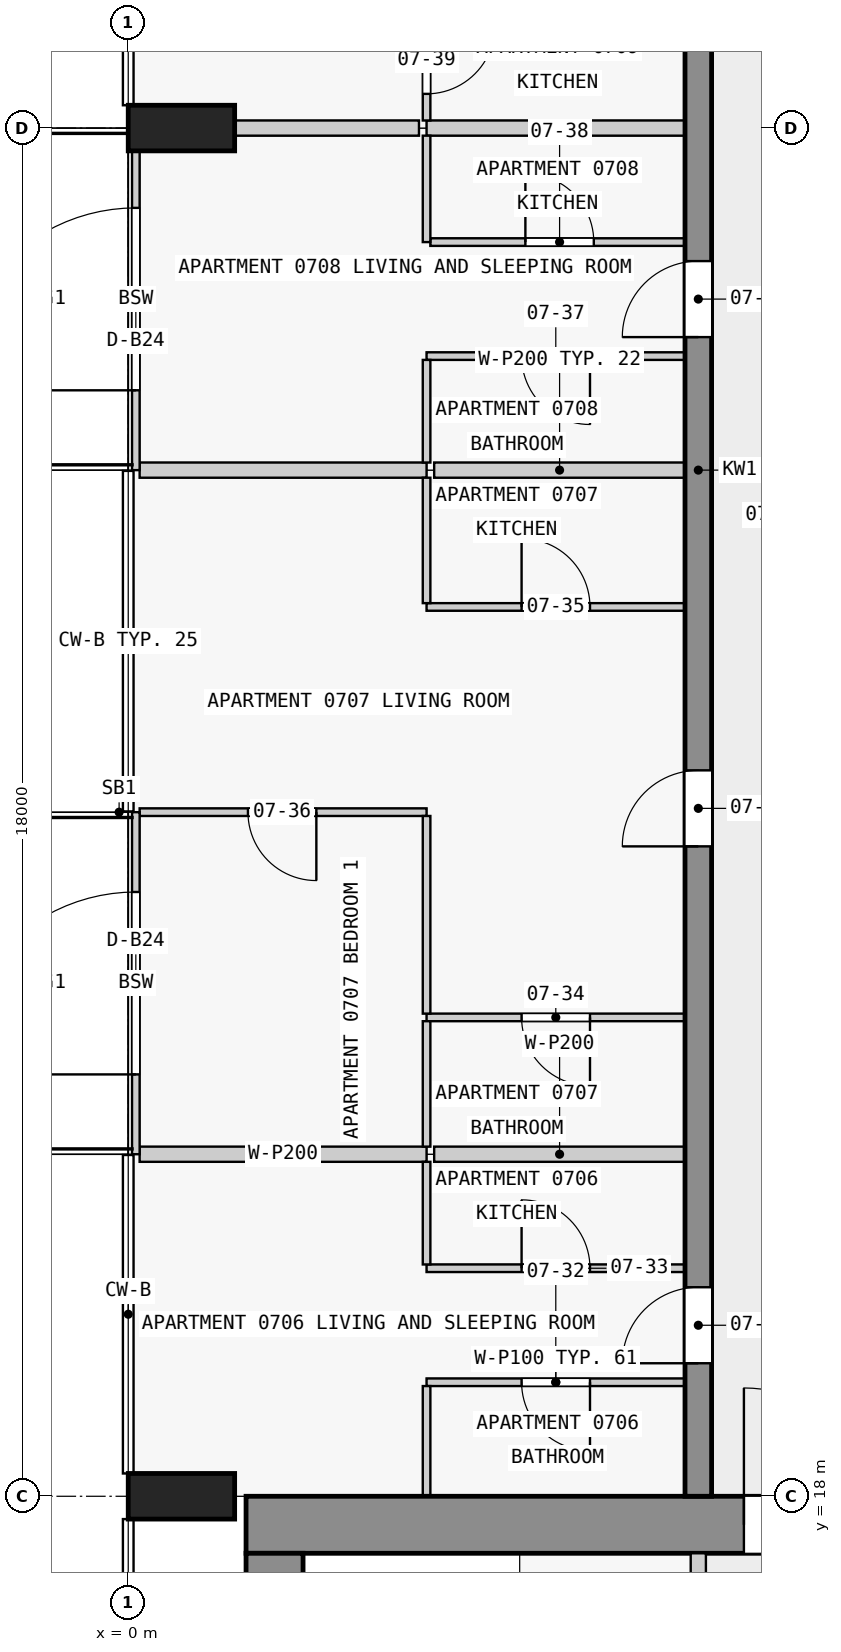
"""IFC4 building model, lengths in metres.
Left out: names, types, materials, properties, quantities, classifications, styles, units other than length and angle.
Written with IfcOpenShell. Run it as: python <this file> out.ifc"""

import sys

from ifc_helpers import new_model, si_unit, direction, frame, frame_2d, origin, origin_2d, place, context, subcontext, project, spatial, rectangle, extrude, element, fill, save


model = new_model("IFC4")
c1 = context("Model", 3, precision=1e-05, world=origin(), true_north=direction((0.0, 1.0)))
c2 = subcontext(c1, "Body", "Model", "MODEL_VIEW")
j1 = project(units=[si_unit("LENGTHUNIT", "METRE"), si_unit("PLANEANGLEUNIT", "RADIAN")], contexts=[c1])
p1 = place(None, origin())
s1 = spatial("IfcSite", under=j1, at=p1, CompositionType="ELEMENT")
p2 = place(p1, origin())
s2 = spatial("IfcBuilding", under=s1, at=p2, CompositionType="ELEMENT")
p3 = place(p2, frame((0.0, 0.0, 33.8)))
s3 = spatial("IfcBuildingStorey", under=s2, at=p3, CompositionType="ELEMENT", Elevation=33.8)
for number, where, z_axis, x_axis in (
    (1, (0.7, 36.0, 0.0), (0.0, 0.0, 1.0), (0.0, 1.0, 0.0)),
    (2, (0.7, 18.0, 0.0), (0.0, 0.0, 1.0), (0.0, 1.0, 0.0)),
):
    element("IfcColumn", number, at=place(p3, frame(where, z_axis=z_axis, x_axis=x_axis)), inside=s3, PredefinedType="COLUMN", context=c2, shape_type="SweptSolid", body=[
        extrude(rectangle(XDim=0.6, YDim=1.4, at=origin_2d()), origin(), (0.0, 0.0, 1.0), 3.5),
    ])
p4 = place(p3, frame((1.55, 17.625, 0.0), z_axis=(0.0, 0.0, 1.0), x_axis=(1.0, 0.0, 0.0)))
e3 = element("IfcWall", 3, at=p4, inside=s3, PredefinedType="SHEAR", context=c2, shape_type="SweptSolid", body=[
    extrude(rectangle(XDim=20.95, YDim=0.75, at=frame_2d((10.475, 0.0))), origin(), (0.0, 0.0, 1.0), 3.25),
])
p5 = place(p4, frame((6.55, 0.0, 0.0)))
e4 = element("IfcOpeningElement", 4, at=p5, cuts=e3, PredefinedType="OPENING", context=c2, shape_type="SweptSolid", body=[
    extrude(rectangle(XDim=1.8, YDim=2.1, at=frame_2d((0.9, 1.05))), frame((0.0, 0.385, 0.0), z_axis=(0.0, -1.0, 0.0), x_axis=(1.0, 0.0, 0.0)), (0.0, 0.0, 1.0), 0.77),
])
p6 = place(p3, frame((1.925, 2.5, 0.0), z_axis=(0.0, 0.0, 1.0), x_axis=(0.0, 1.0, 0.0)))
e5 = element("IfcWall", 5, at=p6, inside=s3, PredefinedType="SHEAR", context=c2, shape_type="SweptSolid", body=[
    extrude(rectangle(XDim=14.75, YDim=0.75, at=frame_2d((7.375, 0.0))), origin(), (0.0, 0.0, 1.0), 3.25),
])
p7 = place(p3, frame((7.5, 18.0, 0.0), z_axis=(0.0, 0.0, 1.0), x_axis=(0.0, 1.0, 0.0)))
e6 = element("IfcWall", 6, at=p7, inside=s3, PredefinedType="SHEAR", context=c2, shape_type="SweptSolid", body=[
    extrude(rectangle(XDim=27.0, YDim=0.35, at=frame_2d((13.5, 0.0))), origin(), (0.0, 0.0, 1.0), 3.25),
])
p8 = place(p7, frame((1.75, 0.0, 0.0)))
e7 = element("IfcOpeningElement", 7, at=p8, cuts=e6, PredefinedType="OPENING", context=c2, shape_type="SweptSolid", body=[
    extrude(rectangle(XDim=1.0, YDim=2.1, at=frame_2d((0.5, 1.05))), frame((0.0, 0.185, 0.0), z_axis=(0.0, -1.0, 0.0), x_axis=(1.0, 0.0, 0.0)), (0.0, 0.0, 1.0), 0.37),
])
p9 = place(p7, frame((8.55, 0.0, 0.0)))
e8 = element("IfcOpeningElement", 8, at=p9, cuts=e6, PredefinedType="OPENING", context=c2, shape_type="SweptSolid", body=[
    extrude(rectangle(XDim=1.0, YDim=2.1, at=frame_2d((0.5, 1.05))), frame((0.0, 0.185, 0.0), z_axis=(0.0, -1.0, 0.0), x_axis=(1.0, 0.0, 0.0)), (0.0, 0.0, 1.0), 0.37),
])
p10 = place(p7, frame((15.25, 0.0, 0.0)))
e9 = element("IfcOpeningElement", 9, at=p10, cuts=e6, PredefinedType="OPENING", context=c2, shape_type="SweptSolid", body=[
    extrude(rectangle(XDim=1.0, YDim=2.1, at=frame_2d((0.5, 1.05))), frame((0.0, 0.185, 0.0), z_axis=(0.0, -1.0, 0.0), x_axis=(1.0, 0.0, 0.0)), (0.0, 0.0, 1.0), 0.37),
])
p11 = place(p7, frame((21.35, 0.0, 0.0)))
e10 = element("IfcOpeningElement", 10, at=p11, cuts=e6, PredefinedType="OPENING", context=c2, shape_type="SweptSolid", body=[
    extrude(rectangle(XDim=1.0, YDim=2.1, at=frame_2d((0.5, 1.05))), frame((0.0, 0.185, 0.0), z_axis=(0.0, -1.0, 0.0), x_axis=(1.0, 0.0, 0.0)), (0.0, 0.0, 1.0), 0.37),
])
p12 = place(p3, frame((0.1, 22.5, 0.0), z_axis=(0.0, 0.0, 1.0), x_axis=(0.0, 1.0, 0.0)))
e11 = element("IfcWall", 11, at=p12, inside=s3, PredefinedType="STANDARD", context=c2, shape_type="SweptSolid", body=[
    extrude(rectangle(XDim=4.5, YDim=0.1, at=frame_2d((2.25, 0.0))), origin(), (0.0, 0.0, 1.0), 3.25),
])
p13 = place(p12, frame((1.05, 0.0, 0.0)))
e12 = element("IfcOpeningElement", 12, at=p13, cuts=e11, PredefinedType="OPENING", context=c2, shape_type="SweptSolid", body=[
    extrude(rectangle(XDim=2.4, YDim=2.4, at=frame_2d((1.2, 1.2))), frame((0.0, 0.06, 0.0), z_axis=(0.0, -1.0, 0.0), x_axis=(1.0, 0.0, 0.0)), (0.0, 0.0, 1.0), 0.12),
])
p14 = place(p3, frame((0.1, 31.5, 0.0), z_axis=(0.0, 0.0, 1.0), x_axis=(0.0, 1.0, 0.0)))
e13 = element("IfcWall", 13, at=p14, inside=s3, PredefinedType="STANDARD", context=c2, shape_type="SweptSolid", body=[
    extrude(rectangle(XDim=4.5, YDim=0.1, at=frame_2d((2.25, 0.0))), origin(), (0.0, 0.0, 1.0), 3.25),
])
p15 = place(p14, frame((1.05, 0.0, 0.0)))
e14 = element("IfcOpeningElement", 14, at=p15, cuts=e13, PredefinedType="OPENING", context=c2, shape_type="SweptSolid", body=[
    extrude(rectangle(XDim=2.4, YDim=2.4, at=frame_2d((1.2, 1.2))), frame((0.0, 0.06, 0.0), z_axis=(0.0, -1.0, 0.0), x_axis=(1.0, 0.0, 0.0)), (0.0, 0.0, 1.0), 0.12),
])
p16 = place(p3, frame((7.5, 10.1, 0.0), z_axis=(0.0, 0.0, 1.0), x_axis=(0.0, 1.0, 0.0)))
e15 = element("IfcWall", 15, at=p16, inside=s3, PredefinedType="PARTITIONING", context=c2, shape_type="SweptSolid", body=[
    extrude(rectangle(XDim=7.15, YDim=0.2, at=frame_2d((3.575, 0.0))), origin(), (0.0, 0.0, 1.0), 3.25),
])
p17 = place(p16, frame((1.05, 0.0, 0.0)))
e16 = element("IfcOpeningElement", 16, at=p17, cuts=e15, PredefinedType="OPENING", context=c2, shape_type="SweptSolid", body=[
    extrude(rectangle(XDim=0.9, YDim=2.1, at=frame_2d((0.45, 1.05))), frame((0.0, 0.11, 0.0), z_axis=(0.0, -1.0, 0.0), x_axis=(1.0, 0.0, 0.0)), (0.0, 0.0, 1.0), 0.22),
])
p18 = place(p16, frame((4.625, 0.0, 0.0)))
e17 = element("IfcOpeningElement", 17, at=p18, cuts=e15, PredefinedType="OPENING", context=c2, shape_type="SweptSolid", body=[
    extrude(rectangle(XDim=0.9, YDim=2.1, at=frame_2d((0.45, 1.05))), frame((0.0, 0.11, 0.0), z_axis=(0.0, -1.0, 0.0), x_axis=(1.0, 0.0, 0.0)), (0.0, 0.0, 1.0), 0.22),
])
p19 = place(p3, frame((7.325, 19.5, 0.0), z_axis=(0.0, 0.0, 1.0), x_axis=(-1.0, 0.0, 0.0)))
e18 = element("IfcWall", 18, at=p19, inside=s3, PredefinedType="PARTITIONING", context=c2, shape_type="SweptSolid", body=[
    extrude(rectangle(XDim=3.4, YDim=0.1, at=frame_2d((1.7, 0.0))), origin(), (0.0, 0.0, 1.0), 3.25),
])
p20 = place(p19, frame((1.25, 0.0, 0.0)))
e19 = element("IfcOpeningElement", 19, at=p20, cuts=e18, PredefinedType="OPENING", context=c2, shape_type="SweptSolid", body=[
    extrude(rectangle(XDim=0.9, YDim=2.1, at=frame_2d((0.45, 1.05))), frame((0.0, 0.06, 0.0), z_axis=(0.0, -1.0, 0.0), x_axis=(1.0, 0.0, 0.0)), (0.0, 0.0, 1.0), 0.12),
])
p21 = place(p3, frame((3.925, 21.0, 0.0), z_axis=(0.0, 0.0, 1.0), x_axis=(1.0, 0.0, 0.0)))
e20 = element("IfcWall", 20, at=p21, inside=s3, PredefinedType="PARTITIONING", context=c2, shape_type="SweptSolid", body=[
    extrude(rectangle(XDim=3.4, YDim=0.1, at=frame_2d((1.7, 0.0))), origin(), (0.0, 0.0, 1.0), 3.25),
])
p22 = place(p21, frame((1.25, 0.0, 0.0)))
e21 = element("IfcOpeningElement", 21, at=p22, cuts=e20, PredefinedType="OPENING", context=c2, shape_type="SweptSolid", body=[
    extrude(rectangle(XDim=0.9, YDim=2.1, at=frame_2d((0.45, 1.05))), frame((0.0, 0.06, 0.0), z_axis=(0.0, -1.0, 0.0), x_axis=(1.0, 0.0, 0.0)), (0.0, 0.0, 1.0), 0.12),
])
p23 = place(p3, frame((7.325, 22.5, 0.0), z_axis=(0.0, 0.0, 1.0), x_axis=(-1.0, 0.0, 0.0)))
e22 = element("IfcWall", 22, at=p23, inside=s3, PredefinedType="PARTITIONING", context=c2, shape_type="SweptSolid", body=[
    extrude(rectangle(XDim=3.3, YDim=0.2, at=frame_2d((1.65, 0.0))), origin(), (0.0, 0.0, 1.0), 3.25),
])
p24 = place(p3, frame((0.15, 22.5, 0.0), z_axis=(0.0, 0.0, 1.0), x_axis=(1.0, 0.0, 0.0)))
e23 = element("IfcWall", 23, at=p24, inside=s3, PredefinedType="PARTITIONING", context=c2, shape_type="SweptSolid", body=[
    extrude(rectangle(XDim=3.775, YDim=0.2, at=frame_2d((1.888, 0.0))), origin(), (0.0, 0.0, 1.0), 3.25),
])
p25 = place(p3, frame((7.325, 24.3, 0.0), z_axis=(0.0, 0.0, 1.0), x_axis=(-1.0, 0.0, 0.0)))
e24 = element("IfcWall", 24, at=p25, inside=s3, PredefinedType="PARTITIONING", context=c2, shape_type="SweptSolid", body=[
    extrude(rectangle(XDim=3.4, YDim=0.1, at=frame_2d((1.7, 0.0))), origin(), (0.0, 0.0, 1.0), 3.25),
])
p26 = place(p25, frame((1.25, 0.0, 0.0)))
e25 = element("IfcOpeningElement", 25, at=p26, cuts=e24, PredefinedType="OPENING", context=c2, shape_type="SweptSolid", body=[
    extrude(rectangle(XDim=0.9, YDim=2.1, at=frame_2d((0.45, 1.05))), frame((0.0, 0.06, 0.0), z_axis=(0.0, -1.0, 0.0), x_axis=(1.0, 0.0, 0.0)), (0.0, 0.0, 1.0), 0.12),
])
p27 = place(p3, frame((3.925, 27.0, 0.0), z_axis=(0.0, 0.0, 1.0), x_axis=(-1.0, 0.0, 0.0)))
e26 = element("IfcWall", 26, at=p27, inside=s3, PredefinedType="PARTITIONING", context=c2, shape_type="SweptSolid", body=[
    extrude(rectangle(XDim=3.775, YDim=0.1, at=frame_2d((1.888, 0.0))), origin(), (0.0, 0.0, 1.0), 3.25),
])
p28 = place(p27, frame((1.45, 0.0, 0.0)))
e27 = element("IfcOpeningElement", 27, at=p28, cuts=e26, PredefinedType="OPENING", context=c2, shape_type="SweptSolid", body=[
    extrude(rectangle(XDim=0.9, YDim=2.1, at=frame_2d((0.45, 1.05))), frame((0.0, 0.06, 0.0), z_axis=(0.0, -1.0, 0.0), x_axis=(1.0, 0.0, 0.0)), (0.0, 0.0, 1.0), 0.12),
])
p29 = place(p3, frame((3.925, 29.7, 0.0), z_axis=(0.0, 0.0, 1.0), x_axis=(1.0, 0.0, 0.0)))
e28 = element("IfcWall", 28, at=p29, inside=s3, PredefinedType="PARTITIONING", context=c2, shape_type="SweptSolid", body=[
    extrude(rectangle(XDim=3.4, YDim=0.1, at=frame_2d((1.7, 0.0))), origin(), (0.0, 0.0, 1.0), 3.25),
])
p30 = place(p29, frame((1.25, 0.0, 0.0)))
e29 = element("IfcOpeningElement", 29, at=p30, cuts=e28, PredefinedType="OPENING", context=c2, shape_type="SweptSolid", body=[
    extrude(rectangle(XDim=0.9, YDim=2.1, at=frame_2d((0.45, 1.05))), frame((0.0, 0.06, 0.0), z_axis=(0.0, -1.0, 0.0), x_axis=(1.0, 0.0, 0.0)), (0.0, 0.0, 1.0), 0.12),
])
p31 = place(p3, frame((7.325, 31.5, 0.0), z_axis=(0.0, 0.0, 1.0), x_axis=(-1.0, 0.0, 0.0)))
e30 = element("IfcWall", 30, at=p31, inside=s3, PredefinedType="PARTITIONING", context=c2, shape_type="SweptSolid", body=[
    extrude(rectangle(XDim=3.3, YDim=0.2, at=frame_2d((1.65, 0.0))), origin(), (0.0, 0.0, 1.0), 3.25),
])
p32 = place(p3, frame((0.15, 31.5, 0.0), z_axis=(0.0, 0.0, 1.0), x_axis=(1.0, 0.0, 0.0)))
e31 = element("IfcWall", 31, at=p32, inside=s3, PredefinedType="PARTITIONING", context=c2, shape_type="SweptSolid", body=[
    extrude(rectangle(XDim=3.775, YDim=0.2, at=frame_2d((1.888, 0.0))), origin(), (0.0, 0.0, 1.0), 3.25),
])
p33 = place(p3, frame((7.325, 33.0, 0.0), z_axis=(0.0, 0.0, 1.0), x_axis=(-1.0, 0.0, 0.0)))
e32 = element("IfcWall", 32, at=p33, inside=s3, PredefinedType="PARTITIONING", context=c2, shape_type="SweptSolid", body=[
    extrude(rectangle(XDim=3.4, YDim=0.1, at=frame_2d((1.7, 0.0))), origin(), (0.0, 0.0, 1.0), 3.25),
])
p34 = place(p33, frame((1.25, 0.0, 0.0)))
e33 = element("IfcOpeningElement", 33, at=p34, cuts=e32, PredefinedType="OPENING", context=c2, shape_type="SweptSolid", body=[
    extrude(rectangle(XDim=0.9, YDim=2.1, at=frame_2d((0.45, 1.05))), frame((0.0, 0.06, 0.0), z_axis=(0.0, -1.0, 0.0), x_axis=(1.0, 0.0, 0.0)), (0.0, 0.0, 1.0), 0.12),
])
p35 = place(p3, frame((3.975, 34.5, 0.0), z_axis=(0.0, 0.0, 1.0), x_axis=(1.0, 0.0, 0.0)))
e34 = element("IfcWall", 34, at=p35, inside=s3, PredefinedType="PARTITIONING", context=c2, shape_type="SweptSolid", body=[
    extrude(rectangle(XDim=3.35, YDim=0.1, at=frame_2d((1.675, 0.0))), origin(), (0.0, 0.0, 1.0), 3.25),
])
p36 = place(p35, frame((1.25, 0.0, 0.0)))
e35 = element("IfcOpeningElement", 35, at=p36, cuts=e34, PredefinedType="OPENING", context=c2, shape_type="SweptSolid", body=[
    extrude(rectangle(XDim=0.9, YDim=2.1, at=frame_2d((0.45, 1.05))), frame((0.0, 0.06, 0.0), z_axis=(0.0, -1.0, 0.0), x_axis=(1.0, 0.0, 0.0)), (0.0, 0.0, 1.0), 0.12),
])
p37 = place(p3, frame((7.325, 36.0, 0.0), z_axis=(0.0, 0.0, 1.0), x_axis=(-1.0, 0.0, 0.0)))
e36 = element("IfcWall", 36, at=p37, inside=s3, PredefinedType="PARTITIONING", context=c2, shape_type="SweptSolid", body=[
    extrude(rectangle(XDim=3.4, YDim=0.2, at=frame_2d((1.7, 0.0))), origin(), (0.0, 0.0, 1.0), 3.25),
])
p38 = place(p3, frame((1.4, 36.0, 0.0), z_axis=(0.0, 0.0, 1.0), x_axis=(1.0, 0.0, 0.0)))
e37 = element("IfcWall", 37, at=p38, inside=s3, PredefinedType="PARTITIONING", context=c2, shape_type="SweptSolid", body=[
    extrude(rectangle(XDim=2.425, YDim=0.2, at=frame_2d((1.212, 0.0))), origin(), (0.0, 0.0, 1.0), 3.25),
])
p39 = place(p3, frame((3.925, 19.45, 0.0), z_axis=(0.0, 0.0, 1.0), x_axis=(0.0, -1.0, 0.0)))
e38 = element("IfcWall", 38, at=p39, inside=s3, PredefinedType="PARTITIONING", context=c2, shape_type="SweptSolid", body=[
    extrude(rectangle(XDim=1.45, YDim=0.1, at=frame_2d((0.725, 0.0))), origin(), (0.0, 0.0, 1.0), 3.25),
])
p40 = place(p3, frame((3.925, 22.4, 0.0), z_axis=(0.0, 0.0, 1.0), x_axis=(0.0, -1.0, 0.0)))
e39 = element("IfcWall", 39, at=p40, inside=s3, PredefinedType="PARTITIONING", context=c2, shape_type="SweptSolid", body=[
    extrude(rectangle(XDim=1.35, YDim=0.1, at=frame_2d((0.675, 0.0))), origin(), (0.0, 0.0, 1.0), 3.25),
])
for number, where, z_axis, x_axis in (
    (40, (3.925, 24.25, 0.0), (0.0, 0.0, 1.0), (0.0, -1.0, 0.0)),
    (41, (3.925, 31.4, 0.0), (0.0, 0.0, 1.0), (0.0, -1.0, 0.0)),
):
    element("IfcWall", number, at=place(p3, frame(where, z_axis=z_axis, x_axis=x_axis)), inside=s3, PredefinedType="PARTITIONING", context=c2, shape_type="SweptSolid", body=[
        extrude(rectangle(XDim=1.65, YDim=0.1, at=frame_2d((0.825, 0.0))), origin(), (0.0, 0.0, 1.0), 3.25),
    ])
p41 = place(p3, frame((3.925, 32.95, 0.0), z_axis=(0.0, 0.0, 1.0), x_axis=(0.0, -1.0, 0.0)))
e42 = element("IfcWall", 42, at=p41, inside=s3, PredefinedType="PARTITIONING", context=c2, shape_type="SweptSolid", body=[
    extrude(rectangle(XDim=1.35, YDim=0.1, at=frame_2d((0.675, 0.0))), origin(), (0.0, 0.0, 1.0), 3.25),
])
p42 = place(p3, frame((3.925, 35.9, 0.0), z_axis=(0.0, 0.0, 1.0), x_axis=(0.0, -1.0, 0.0)))
e43 = element("IfcWall", 43, at=p42, inside=s3, PredefinedType="PARTITIONING", context=c2, shape_type="SweptSolid", body=[
    extrude(rectangle(XDim=1.4, YDim=0.1, at=frame_2d((0.7, 0.0))), origin(), (0.0, 0.0, 1.0), 3.25),
])
p43 = place(p3, frame((3.925, 39.1, 0.0), z_axis=(0.0, 0.0, 1.0), x_axis=(0.0, -1.0, 0.0)))
e44 = element("IfcWall", 44, at=p43, inside=s3, PredefinedType="PARTITIONING", context=c2, shape_type="SweptSolid", body=[
    extrude(rectangle(XDim=3.0, YDim=0.1, at=frame_2d((1.5, 0.0))), origin(), (0.0, 0.0, 1.0), 3.25),
])
p44 = place(p43, frame((1.75, 0.0, 0.0)))
e45 = element("IfcOpeningElement", 45, at=p44, cuts=e44, PredefinedType="OPENING", context=c2, shape_type="SweptSolid", body=[
    extrude(rectangle(XDim=0.9, YDim=2.1, at=frame_2d((0.45, 1.05))), frame((0.0, 0.06, 0.0), z_axis=(0.0, -1.0, 0.0), x_axis=(1.0, 0.0, 0.0)), (0.0, 0.0, 1.0), 0.12),
])
p45 = place(p3, frame((3.925, 24.35, 0.0), z_axis=(0.0, 0.0, 1.0), x_axis=(0.0, 1.0, 0.0)))
e46 = element("IfcWall", 46, at=p45, inside=s3, PredefinedType="PARTITIONING", context=c2, shape_type="SweptSolid", body=[
    extrude(rectangle(XDim=2.6, YDim=0.1, at=frame_2d((1.3, 0.0))), origin(), (0.0, 0.0, 1.0), 3.25),
])
p46 = place(p13, origin())
e47 = element("IfcDoor", 47, at=p46, inside=s3, OperationType="SINGLE_SWING_LEFT", PredefinedType="DOOR", context=c2, shape_type="SweptSolid", body=[
    extrude(rectangle(XDim=2.4, YDim=2.4, at=frame_2d((1.2, 1.2))), frame((0.0, 0.025, 0.0), z_axis=(0.0, -1.0, 0.0), x_axis=(1.0, 0.0, 0.0)), (0.0, 0.0, 1.0), 0.05),
])
fill(e12, e47)
p47 = place(p15, origin())
e48 = element("IfcDoor", 48, at=p47, inside=s3, OperationType="SINGLE_SWING_LEFT", PredefinedType="DOOR", context=c2, shape_type="SweptSolid", body=[
    extrude(rectangle(XDim=2.4, YDim=2.4, at=frame_2d((1.2, 1.2))), frame((0.0, 0.025, 0.0), z_axis=(0.0, -1.0, 0.0), x_axis=(1.0, 0.0, 0.0)), (0.0, 0.0, 1.0), 0.05),
])
fill(e14, e48)
p48 = place(p5, origin())
e49 = element("IfcDoor", 49, at=p48, inside=s3, OperationType="DOUBLE_DOOR_SINGLE_SWING", PredefinedType="DOOR", context=c2, shape_type="SweptSolid", body=[
    extrude(rectangle(XDim=1.8, YDim=2.1, at=frame_2d((0.9, 1.05))), frame((0.0, 0.025, 0.0), z_axis=(0.0, -1.0, 0.0), x_axis=(1.0, 0.0, 0.0)), (0.0, 0.0, 1.0), 0.05),
])
fill(e4, e49)
p49 = place(p8, origin())
e50 = element("IfcDoor", 50, at=p49, inside=s3, OperationType="SINGLE_SWING_LEFT", PredefinedType="DOOR", context=c2, shape_type="SweptSolid", body=[
    extrude(rectangle(XDim=1.0, YDim=2.1, at=frame_2d((0.5, 1.05))), frame((0.0, 0.025, 0.0), z_axis=(0.0, -1.0, 0.0), x_axis=(1.0, 0.0, 0.0)), (0.0, 0.0, 1.0), 0.05),
])
fill(e7, e50)
p50 = place(p9, origin())
e51 = element("IfcDoor", 51, at=p50, inside=s3, OperationType="SINGLE_SWING_LEFT", PredefinedType="DOOR", context=c2, shape_type="SweptSolid", body=[
    extrude(rectangle(XDim=1.0, YDim=2.1, at=frame_2d((0.5, 1.05))), frame((0.0, 0.025, 0.0), z_axis=(0.0, -1.0, 0.0), x_axis=(1.0, 0.0, 0.0)), (0.0, 0.0, 1.0), 0.05),
])
fill(e8, e51)
p51 = place(p10, origin())
e52 = element("IfcDoor", 52, at=p51, inside=s3, OperationType="SINGLE_SWING_RIGHT", PredefinedType="DOOR", context=c2, shape_type="SweptSolid", body=[
    extrude(rectangle(XDim=1.0, YDim=2.1, at=frame_2d((0.5, 1.05))), frame((0.0, 0.025, 0.0), z_axis=(0.0, -1.0, 0.0), x_axis=(1.0, 0.0, 0.0)), (0.0, 0.0, 1.0), 0.05),
])
fill(e9, e52)
p52 = place(p20, origin())
e53 = element("IfcDoor", 53, at=p52, inside=s3, OperationType="SINGLE_SWING_LEFT", PredefinedType="DOOR", context=c2, shape_type="SweptSolid", body=[
    extrude(rectangle(XDim=0.9, YDim=2.1, at=frame_2d((0.45, 1.05))), frame((0.0, 0.025, 0.0), z_axis=(0.0, -1.0, 0.0), x_axis=(1.0, 0.0, 0.0)), (0.0, 0.0, 1.0), 0.05),
])
fill(e19, e53)
p53 = place(p22, origin())
e54 = element("IfcDoor", 54, at=p53, inside=s3, OperationType="SINGLE_SWING_LEFT", PredefinedType="DOOR", context=c2, shape_type="SweptSolid", body=[
    extrude(rectangle(XDim=0.9, YDim=2.1, at=frame_2d((0.45, 1.05))), frame((0.0, 0.025, 0.0), z_axis=(0.0, -1.0, 0.0), x_axis=(1.0, 0.0, 0.0)), (0.0, 0.0, 1.0), 0.05),
])
fill(e21, e54)
p54 = place(p26, origin())
e55 = element("IfcDoor", 55, at=p54, inside=s3, OperationType="SINGLE_SWING_LEFT", PredefinedType="DOOR", context=c2, shape_type="SweptSolid", body=[
    extrude(rectangle(XDim=0.9, YDim=2.1, at=frame_2d((0.45, 1.05))), frame((0.0, 0.025, 0.0), z_axis=(0.0, -1.0, 0.0), x_axis=(1.0, 0.0, 0.0)), (0.0, 0.0, 1.0), 0.05),
])
fill(e25, e55)
p55 = place(p30, origin())
e56 = element("IfcDoor", 56, at=p55, inside=s3, OperationType="SINGLE_SWING_LEFT", PredefinedType="DOOR", context=c2, shape_type="SweptSolid", body=[
    extrude(rectangle(XDim=0.9, YDim=2.1, at=frame_2d((0.45, 1.05))), frame((0.0, 0.025, 0.0), z_axis=(0.0, -1.0, 0.0), x_axis=(1.0, 0.0, 0.0)), (0.0, 0.0, 1.0), 0.05),
])
fill(e29, e56)
p56 = place(p28, origin())
e57 = element("IfcDoor", 57, at=p56, inside=s3, OperationType="SINGLE_SWING_RIGHT", PredefinedType="DOOR", context=c2, shape_type="SweptSolid", body=[
    extrude(rectangle(XDim=0.9, YDim=2.1, at=frame_2d((0.45, 1.05))), frame((0.0, 0.025, 0.0), z_axis=(0.0, -1.0, 0.0), x_axis=(1.0, 0.0, 0.0)), (0.0, 0.0, 1.0), 0.05),
])
fill(e27, e57)
p57 = place(p34, origin())
e58 = element("IfcDoor", 58, at=p57, inside=s3, OperationType="SINGLE_SWING_LEFT", PredefinedType="DOOR", context=c2, shape_type="SweptSolid", body=[
    extrude(rectangle(XDim=0.9, YDim=2.1, at=frame_2d((0.45, 1.05))), frame((0.0, 0.025, 0.0), z_axis=(0.0, -1.0, 0.0), x_axis=(1.0, 0.0, 0.0)), (0.0, 0.0, 1.0), 0.05),
])
fill(e33, e58)
p58 = place(p36, origin())
e59 = element("IfcDoor", 59, at=p58, inside=s3, OperationType="SINGLE_SWING_RIGHT", PredefinedType="DOOR", context=c2, shape_type="SweptSolid", body=[
    extrude(rectangle(XDim=0.9, YDim=2.1, at=frame_2d((0.45, 1.05))), frame((0.0, 0.025, 0.0), z_axis=(0.0, -1.0, 0.0), x_axis=(1.0, 0.0, 0.0)), (0.0, 0.0, 1.0), 0.05),
])
fill(e35, e59)
p59 = place(p44, origin())
e60 = element("IfcDoor", 60, at=p59, inside=s3, OperationType="SINGLE_SWING_RIGHT", PredefinedType="DOOR", context=c2, shape_type="SweptSolid", body=[
    extrude(rectangle(XDim=0.9, YDim=2.1, at=frame_2d((0.45, 1.05))), frame((0.0, 0.025, 0.0), z_axis=(0.0, -1.0, 0.0), x_axis=(1.0, 0.0, 0.0)), (0.0, 0.0, 1.0), 0.05),
])
fill(e45, e60)
save(model, sys.argv[1])
